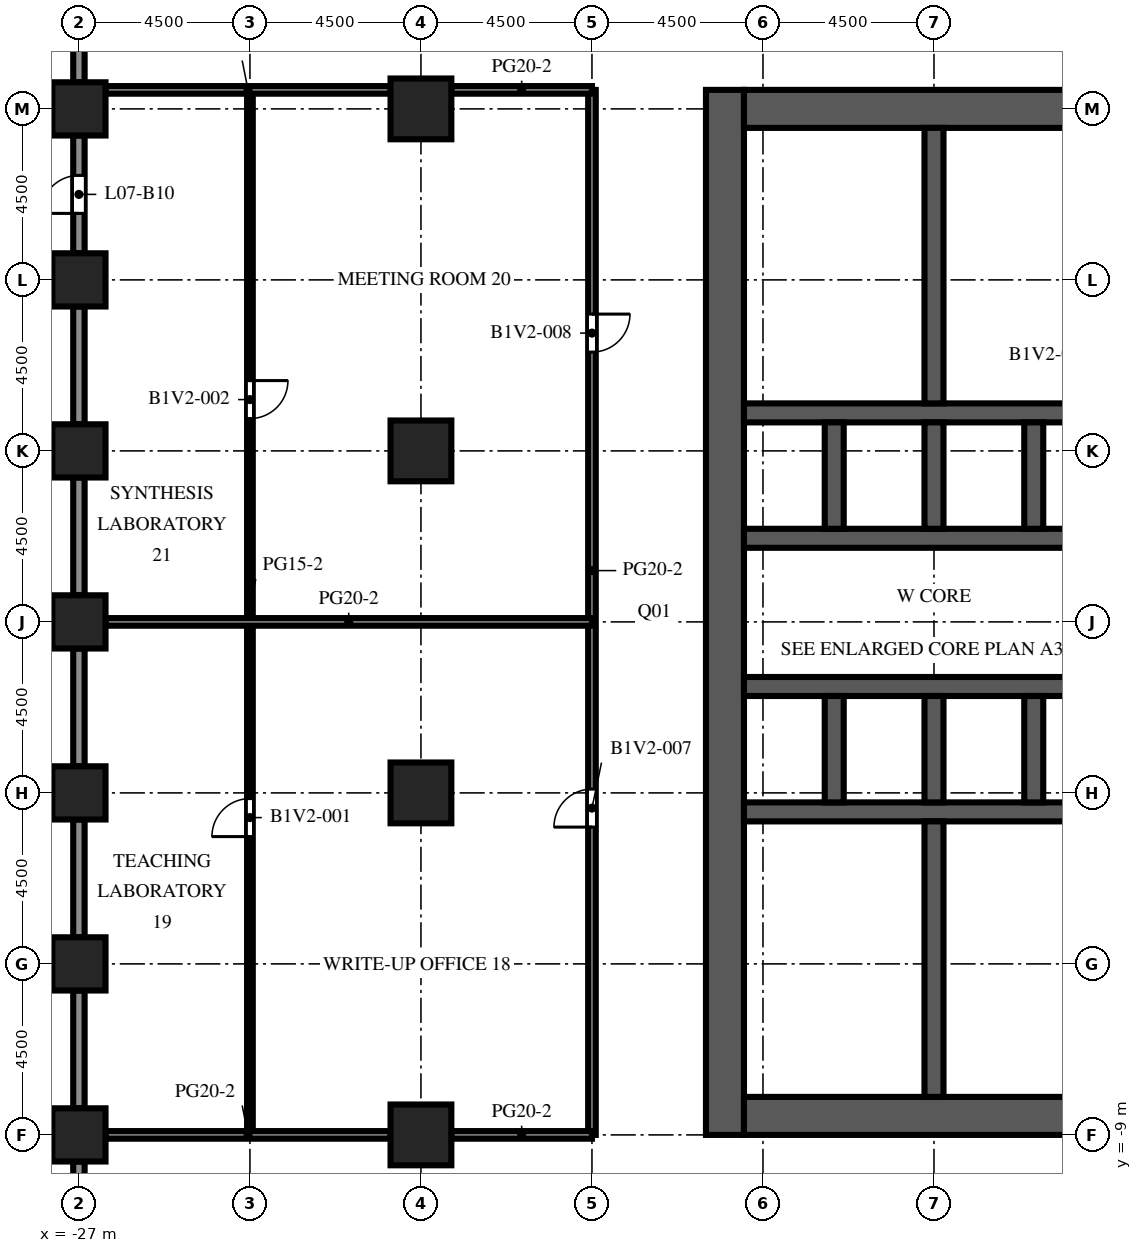
"""IFC4 building model, lengths in metres.
Left out: names, types, materials, properties, quantities, classifications, styles, units other than length and angle.
Written with IfcOpenShell. Run it as: python <this file> out.ifc"""

import sys

from ifc_helpers import new_model, si_unit, direction, frame, frame_2d, origin, origin_2d, place, context, subcontext, project, spatial, rectangle, extrude, element, fill, save


model = new_model("IFC4")
c1 = context("Model", 3, precision=1e-05, world=origin(), true_north=direction((0.0, 1.0)))
c2 = subcontext(c1, "Body", "Model", "MODEL_VIEW")
j1 = project(units=[si_unit("LENGTHUNIT", "METRE"), si_unit("PLANEANGLEUNIT", "RADIAN")], contexts=[c1])
p1 = place(None, origin())
s1 = spatial("IfcSite", under=j1, at=p1, CompositionType="ELEMENT")
p2 = place(p1, origin())
s2 = spatial("IfcBuilding", under=s1, at=p2, CompositionType="ELEMENT")
p3 = place(p2, frame((0.0, 0.0, 31.8)))
s3 = spatial("IfcBuildingStorey", under=s2, at=p3, CompositionType="ELEMENT", Elevation=31.8)
for number, where, z_axis, x_axis in (
    (1, (-27.0, -9.0, 0.0), (0.0, 0.0, 1.0), (1.0, 0.0, 0.0)),
    (2, (-27.0, -4.5, 0.0), (0.0, 0.0, 1.0), (1.0, 0.0, 0.0)),
    (3, (-27.0, 0.0, 0.0), (0.0, 0.0, 1.0), (1.0, 0.0, 0.0)),
    (4, (-27.0, 4.5, 0.0), (0.0, 0.0, 1.0), (1.0, 0.0, 0.0)),
    (5, (-27.0, 9.0, 0.0), (0.0, 0.0, 1.0), (1.0, 0.0, 0.0)),
    (6, (-27.0, 13.5, 0.0), (0.0, 0.0, 1.0), (1.0, 0.0, 0.0)),
    (7, (-27.0, 18.0, 0.0), (0.0, 0.0, 1.0), (1.0, 0.0, 0.0)),
):
    element("IfcColumn", number, at=place(p3, frame(where, z_axis=z_axis, x_axis=x_axis)), inside=s3, PredefinedType="COLUMN", context=c2, shape_type="SweptSolid", body=[
        extrude(rectangle(XDim=1.4, YDim=1.4, at=origin_2d()), origin(), (0.0, 0.0, 1.0), 4.1),
    ])
for number, where, z_axis, x_axis in (
    (8, (-18.0, -9.0, 0.0), (0.0, 0.0, 1.0), (1.0, 0.0, 0.0)),
    (9, (-18.0, 0.0, 0.0), (0.0, 0.0, 1.0), (1.0, 0.0, 0.0)),
    (10, (-18.0, 9.0, 0.0), (0.0, 0.0, 1.0), (1.0, 0.0, 0.0)),
    (11, (-18.0, 18.0, 0.0), (0.0, 0.0, 1.0), (1.0, 0.0, 0.0)),
):
    element("IfcColumn", number, at=place(p3, frame(where, z_axis=z_axis, x_axis=x_axis)), inside=s3, PredefinedType="COLUMN", context=c2, shape_type="SweptSolid", body=[
        extrude(rectangle(XDim=1.6, YDim=1.6, at=origin_2d()), origin(), (0.0, 0.0, 1.0), 4.1),
    ])
p4 = place(p3, frame((-10.0, -9.0, 0.0), z_axis=(0.0, 0.0, 1.0), x_axis=(0.0, 1.0, 0.0)))
e12 = element("IfcWall", 12, at=p4, inside=s3, PredefinedType="SHEAR", context=c2, shape_type="SweptSolid", body=[
    extrude(rectangle(XDim=27.5, YDim=1.0, at=frame_2d((13.75, 0.0))), origin(), (0.0, 0.0, 1.0), 4.1),
])
p5 = place(p4, frame((12.55, 0.0, 0.0)))
e13 = element("IfcOpeningElement", 13, at=p5, cuts=e12, PredefinedType="OPENING", context=c2, shape_type="SweptSolid", body=[
    extrude(rectangle(XDim=2.4, YDim=2.4, at=frame_2d((1.2, 1.2))), frame((0.0, 0.51, 0.0), z_axis=(0.0, -1.0, 0.0), x_axis=(1.0, 0.0, 0.0)), (0.0, 0.0, 1.0), 1.02),
])
p6 = place(p4, frame((6.825, 0.0, 0.0)))
e14 = element("IfcOpeningElement", 14, at=p6, cuts=e12, PredefinedType="OPENING", context=c2, shape_type="SweptSolid", body=[
    extrude(rectangle(XDim=1.2, YDim=2.1, at=frame_2d((0.6, 1.05))), frame((0.0, 0.51, 0.0), z_axis=(0.0, -1.0, 0.0), x_axis=(1.0, 0.0, 0.0)), (0.0, 0.0, 1.0), 1.02),
])
p7 = place(p4, frame((19.475, 0.0, 0.0)))
e15 = element("IfcOpeningElement", 15, at=p7, cuts=e12, PredefinedType="OPENING", context=c2, shape_type="SweptSolid", body=[
    extrude(rectangle(XDim=1.2, YDim=2.1, at=frame_2d((0.6, 1.05))), frame((0.0, 0.51, 0.0), z_axis=(0.0, -1.0, 0.0), x_axis=(1.0, 0.0, 0.0)), (0.0, 0.0, 1.0), 1.02),
])
for number, where, z_axis, x_axis in (
    (16, (-9.5, -8.5, 0.0), (0.0, 0.0, 1.0), (1.0, 0.0, 0.0)),
    (17, (-9.5, 18.0, 0.0), (0.0, 0.0, 1.0), (1.0, 0.0, 0.0)),
):
    element("IfcWall", number, at=place(p3, frame(where, z_axis=z_axis, x_axis=x_axis)), inside=s3, PredefinedType="SHEAR", context=c2, shape_type="SweptSolid", body=[
        extrude(rectangle(XDim=10.0, YDim=1.0, at=frame_2d((5.0, 0.0))), origin(), (0.0, 0.0, 1.0), 4.1),
    ])
p8 = place(p3, frame((-9.5, -0.5, 0.0), z_axis=(0.0, 0.0, 1.0), x_axis=(1.0, 0.0, 0.0)))
e18 = element("IfcWall", 18, at=p8, inside=s3, PredefinedType="SHEAR", context=c2, shape_type="SweptSolid", body=[
    extrude(rectangle(XDim=10.0, YDim=0.5, at=frame_2d((5.0, 0.0))), origin(), (0.0, 0.0, 1.0), 4.1),
])
p9 = place(p3, frame((-9.5, 2.8, 0.0), z_axis=(0.0, 0.0, 1.0), x_axis=(1.0, 0.0, 0.0)))
e19 = element("IfcWall", 19, at=p9, inside=s3, PredefinedType="SHEAR", context=c2, shape_type="SweptSolid", body=[
    extrude(rectangle(XDim=10.0, YDim=0.5, at=frame_2d((5.0, 0.0))), origin(), (0.0, 0.0, 1.0), 4.1),
])
p10 = place(p9, frame((0.512, 0.0, 0.0)))
e20 = element("IfcOpeningElement", 20, at=p10, cuts=e19, PredefinedType="OPENING", context=c2, shape_type="SweptSolid", body=[
    extrude(rectangle(XDim=1.1, YDim=2.1, at=frame_2d((0.55, 1.05))), frame((0.0, 0.26, 0.0), z_axis=(0.0, -1.0, 0.0), x_axis=(1.0, 0.0, 0.0)), (0.0, 0.0, 1.0), 0.52),
])
p11 = place(p9, frame((3.137, 0.0, 0.0)))
e21 = element("IfcOpeningElement", 21, at=p11, cuts=e19, PredefinedType="OPENING", context=c2, shape_type="SweptSolid", body=[
    extrude(rectangle(XDim=1.1, YDim=2.1, at=frame_2d((0.55, 1.05))), frame((0.0, 0.26, 0.0), z_axis=(0.0, -1.0, 0.0), x_axis=(1.0, 0.0, 0.0)), (0.0, 0.0, 1.0), 0.52),
])
p12 = place(p9, frame((8.387, 0.0, 0.0)))
e22 = element("IfcOpeningElement", 22, at=p12, cuts=e19, PredefinedType="OPENING", context=c2, shape_type="SweptSolid", body=[
    extrude(rectangle(XDim=1.1, YDim=2.1, at=frame_2d((0.55, 1.05))), frame((0.0, 0.26, 0.0), z_axis=(0.0, -1.0, 0.0), x_axis=(1.0, 0.0, 0.0)), (0.0, 0.0, 1.0), 0.52),
])
p13 = place(p3, frame((-9.5, 6.7, 0.0), z_axis=(0.0, 0.0, 1.0), x_axis=(1.0, 0.0, 0.0)))
e23 = element("IfcWall", 23, at=p13, inside=s3, PredefinedType="SHEAR", context=c2, shape_type="SweptSolid", body=[
    extrude(rectangle(XDim=10.0, YDim=0.5, at=frame_2d((5.0, 0.0))), origin(), (0.0, 0.0, 1.0), 4.1),
])
p14 = place(p13, frame((0.512, 0.0, 0.0)))
e24 = element("IfcOpeningElement", 24, at=p14, cuts=e23, PredefinedType="OPENING", context=c2, shape_type="SweptSolid", body=[
    extrude(rectangle(XDim=1.1, YDim=2.1, at=frame_2d((0.55, 1.05))), frame((0.0, 0.26, 0.0), z_axis=(0.0, -1.0, 0.0), x_axis=(1.0, 0.0, 0.0)), (0.0, 0.0, 1.0), 0.52),
])
p15 = place(p13, frame((3.188, 0.0, 0.0)))
e25 = element("IfcOpeningElement", 25, at=p15, cuts=e23, PredefinedType="OPENING", context=c2, shape_type="SweptSolid", body=[
    extrude(rectangle(XDim=1.0, YDim=2.1, at=frame_2d((0.5, 1.05))), frame((0.0, 0.26, 0.0), z_axis=(0.0, -1.0, 0.0), x_axis=(1.0, 0.0, 0.0)), (0.0, 0.0, 1.0), 0.52),
])
p16 = place(p13, frame((5.812, 0.0, 0.0)))
e26 = element("IfcOpeningElement", 26, at=p16, cuts=e23, PredefinedType="OPENING", context=c2, shape_type="SweptSolid", body=[
    extrude(rectangle(XDim=1.0, YDim=2.1, at=frame_2d((0.5, 1.05))), frame((0.0, 0.26, 0.0), z_axis=(0.0, -1.0, 0.0), x_axis=(1.0, 0.0, 0.0)), (0.0, 0.0, 1.0), 0.52),
])
p17 = place(p13, frame((8.438, 0.0, 0.0)))
e27 = element("IfcOpeningElement", 27, at=p17, cuts=e23, PredefinedType="OPENING", context=c2, shape_type="SweptSolid", body=[
    extrude(rectangle(XDim=1.0, YDim=2.1, at=frame_2d((0.5, 1.05))), frame((0.0, 0.26, 0.0), z_axis=(0.0, -1.0, 0.0), x_axis=(1.0, 0.0, 0.0)), (0.0, 0.0, 1.0), 0.52),
])
p18 = place(p3, frame((-9.5, 10.0, 0.0), z_axis=(0.0, 0.0, 1.0), x_axis=(1.0, 0.0, 0.0)))
e28 = element("IfcWall", 28, at=p18, inside=s3, PredefinedType="SHEAR", context=c2, shape_type="SweptSolid", body=[
    extrude(rectangle(XDim=10.0, YDim=0.5, at=frame_2d((5.0, 0.0))), origin(), (0.0, 0.0, 1.0), 4.1),
])
for number, where, z_axis, x_axis in (
    (29, (-7.125, -0.25, 0.0), (0.0, 0.0, 1.0), (0.0, 1.0, 0.0)),
    (30, (-7.125, 6.95, 0.0), (0.0, 0.0, 1.0), (0.0, 1.0, 0.0)),
    (31, (-4.5, -0.25, 0.0), (0.0, 0.0, 1.0), (0.0, 1.0, 0.0)),
    (32, (-4.5, 6.95, 0.0), (0.0, 0.0, 1.0), (0.0, 1.0, 0.0)),
    (33, (-1.875, -0.25, 0.0), (0.0, 0.0, 1.0), (0.0, 1.0, 0.0)),
    (34, (-1.875, 6.95, 0.0), (0.0, 0.0, 1.0), (0.0, 1.0, 0.0)),
):
    element("IfcWall", number, at=place(p3, frame(where, z_axis=z_axis, x_axis=x_axis)), inside=s3, PredefinedType="SHEAR", context=c2, shape_type="SweptSolid", body=[
        extrude(rectangle(XDim=2.8, YDim=0.5, at=frame_2d((1.4, 0.0))), origin(), (0.0, 0.0, 1.0), 4.1),
    ])
for number, where, z_axis, x_axis in (
    (35, (-4.5, -8.0, 0.0), (0.0, 0.0, 1.0), (0.0, 1.0, 0.0)),
    (36, (-4.5, 10.25, 0.0), (0.0, 0.0, 1.0), (0.0, 1.0, 0.0)),
):
    element("IfcWall", number, at=place(p3, frame(where, z_axis=z_axis, x_axis=x_axis)), inside=s3, PredefinedType="SHEAR", context=c2, shape_type="SweptSolid", body=[
        extrude(rectangle(XDim=7.25, YDim=0.5, at=frame_2d((3.625, 0.0))), origin(), (0.0, 0.0, 1.0), 4.1),
    ])
p19 = place(p3, frame((-27.0, 18.7, 0.0), z_axis=(0.0, 0.0, 1.0), x_axis=(0.0, 1.0, 0.0)))
e37 = element("IfcWall", 37, at=p19, inside=s3, PredefinedType="SOLIDWALL", context=c2, shape_type="SweptSolid", body=[
    extrude(rectangle(XDim=3.1, YDim=0.3, at=frame_2d((1.55, 0.0))), origin(), (0.0, 0.0, 1.0), 2.6),
])
p20 = place(p3, frame((-27.0, 14.2, 0.0), z_axis=(0.0, 0.0, 1.0), x_axis=(0.0, 1.0, 0.0)))
e38 = element("IfcWall", 38, at=p20, inside=s3, PredefinedType="SOLIDWALL", context=c2, shape_type="SweptSolid", body=[
    extrude(rectangle(XDim=3.1, YDim=0.3, at=frame_2d((1.55, 0.0))), origin(), (0.0, 0.0, 1.0), 2.6),
])
p21 = place(p20, frame((1.05, 0.0, 0.0)))
e39 = element("IfcOpeningElement", 39, at=p21, cuts=e38, PredefinedType="OPENING", context=c2, shape_type="SweptSolid", body=[
    extrude(rectangle(XDim=1.0, YDim=2.2, at=frame_2d((0.5, 1.1))), frame((0.0, 0.16, 0.0), z_axis=(0.0, -1.0, 0.0), x_axis=(1.0, 0.0, 0.0)), (0.0, 0.0, 1.0), 0.32),
])
for number, where, z_axis, x_axis in (
    (40, (-27.0, 9.7, 0.0), (0.0, 0.0, 1.0), (0.0, 1.0, 0.0)),
    (41, (-27.0, 5.2, 0.0), (0.0, 0.0, 1.0), (0.0, 1.0, 0.0)),
    (42, (-27.0, 0.7, 0.0), (0.0, 0.0, 1.0), (0.0, 1.0, 0.0)),
    (43, (-27.0, -3.8, 0.0), (0.0, 0.0, 1.0), (0.0, 1.0, 0.0)),
    (44, (-27.0, -8.3, 0.0), (0.0, 0.0, 1.0), (0.0, 1.0, 0.0)),
    (45, (-27.0, -12.8, 0.0), (0.0, 0.0, 1.0), (0.0, 1.0, 0.0)),
):
    element("IfcWall", number, at=place(p3, frame(where, z_axis=z_axis, x_axis=x_axis)), inside=s3, PredefinedType="SOLIDWALL", context=c2, shape_type="SweptSolid", body=[
        extrude(rectangle(XDim=3.1, YDim=0.3, at=frame_2d((1.55, 0.0))), origin(), (0.0, 0.0, 1.0), 2.6),
    ])
p22 = place(p3, frame((-1.1, -5.825, 0.0), z_axis=(0.0, 0.0, 1.0), x_axis=(0.0, 1.0, 0.0)))
e46 = element("IfcWall", 46, at=p22, inside=s3, PredefinedType="PARTITIONING", context=c2, shape_type="SweptSolid", body=[
    extrude(rectangle(XDim=2.9, YDim=0.1, at=frame_2d((1.45, 0.0))), origin(), (0.0, 0.0, 1.0), 3.5),
])
p23 = place(p22, frame((0.95, 0.0, 0.0)))
e47 = element("IfcOpeningElement", 47, at=p23, cuts=e46, PredefinedType="OPENING", context=c2, shape_type="SweptSolid", body=[
    extrude(rectangle(XDim=1.0, YDim=2.1, at=frame_2d((0.5, 1.05))), frame((0.0, 0.06, 0.0), z_axis=(0.0, -1.0, 0.0), x_axis=(1.0, 0.0, 0.0)), (0.0, 0.0, 1.0), 0.12),
])
for number, where, z_axis, x_axis in (
    (48, (-4.25, -5.825, 0.0), (0.0, 0.0, 1.0), (1.0, 0.0, 0.0)),
    (49, (-4.25, -2.925, 0.0), (0.0, 0.0, 1.0), (1.0, 0.0, 0.0)),
):
    element("IfcWall", number, at=place(p3, frame(where, z_axis=z_axis, x_axis=x_axis)), inside=s3, PredefinedType="PARTITIONING", context=c2, shape_type="SweptSolid", body=[
        extrude(rectangle(XDim=3.15, YDim=0.1, at=frame_2d((1.575, 0.0))), origin(), (0.0, 0.0, 1.0), 3.5),
    ])
for number, where, z_axis, x_axis in (
    (50, (-4.25, 11.7, 0.0), (0.0, 0.0, 1.0), (1.0, 0.0, 0.0)),
    (51, (-4.25, 13.512, 0.0), (0.0, 0.0, 1.0), (1.0, 0.0, 0.0)),
    (52, (-4.25, 15.688, 0.0), (0.0, 0.0, 1.0), (1.0, 0.0, 0.0)),
):
    element("IfcWall", number, at=place(p3, frame(where, z_axis=z_axis, x_axis=x_axis)), inside=s3, PredefinedType="PARTITIONING", context=c2, shape_type="SweptSolid", body=[
        extrude(rectangle(XDim=4.75, YDim=0.1, at=frame_2d((2.375, 0.0))), origin(), (0.0, 0.0, 1.0), 3.5),
    ])
p24 = place(p3, frame((-22.5, -9.0, 0.0), z_axis=(0.0, 0.0, 1.0), x_axis=(0.0, 1.0, 0.0)))
e53 = element("IfcWall", 53, at=p24, inside=s3, PredefinedType="PARTITIONING", context=c2, shape_type="SweptSolid", body=[
    extrude(rectangle(XDim=27.5, YDim=0.15, at=frame_2d((13.75, 0.0))), origin(), (0.0, 0.0, 1.0), 3.5),
])
p25 = place(p24, frame((7.85, 0.0, 0.0)))
e54 = element("IfcOpeningElement", 54, at=p25, cuts=e53, PredefinedType="OPENING", context=c2, shape_type="SweptSolid", body=[
    extrude(rectangle(XDim=1.0, YDim=2.1, at=frame_2d((0.5, 1.05))), frame((0.0, 0.085, 0.0), z_axis=(0.0, -1.0, 0.0), x_axis=(1.0, 0.0, 0.0)), (0.0, 0.0, 1.0), 0.17),
])
p26 = place(p24, frame((18.85, 0.0, 0.0)))
e55 = element("IfcOpeningElement", 55, at=p26, cuts=e53, PredefinedType="OPENING", context=c2, shape_type="SweptSolid", body=[
    extrude(rectangle(XDim=1.0, YDim=2.1, at=frame_2d((0.5, 1.05))), frame((0.0, 0.085, 0.0), z_axis=(0.0, -1.0, 0.0), x_axis=(1.0, 0.0, 0.0)), (0.0, 0.0, 1.0), 0.17),
])
p27 = place(p3, frame((-13.5, -9.0, 0.0), z_axis=(0.0, 0.0, 1.0), x_axis=(0.0, 1.0, 0.0)))
e56 = element("IfcWall", 56, at=p27, inside=s3, PredefinedType="PARTITIONING", context=c2, shape_type="SweptSolid", body=[
    extrude(rectangle(XDim=27.5, YDim=0.2, at=frame_2d((13.75, 0.0))), origin(), (0.0, 0.0, 1.0), 3.5),
])
p28 = place(p27, frame((8.1, 0.0, 0.0)))
e57 = element("IfcOpeningElement", 57, at=p28, cuts=e56, PredefinedType="OPENING", context=c2, shape_type="SweptSolid", body=[
    extrude(rectangle(XDim=1.0, YDim=2.1, at=frame_2d((0.5, 1.05))), frame((0.0, 0.11, 0.0), z_axis=(0.0, -1.0, 0.0), x_axis=(1.0, 0.0, 0.0)), (0.0, 0.0, 1.0), 0.22),
])
p29 = place(p27, frame((20.6, 0.0, 0.0)))
e58 = element("IfcOpeningElement", 58, at=p29, cuts=e56, PredefinedType="OPENING", context=c2, shape_type="SweptSolid", body=[
    extrude(rectangle(XDim=1.0, YDim=2.1, at=frame_2d((0.5, 1.05))), frame((0.0, 0.11, 0.0), z_axis=(0.0, -1.0, 0.0), x_axis=(1.0, 0.0, 0.0)), (0.0, 0.0, 1.0), 0.22),
])
p30 = place(p3, frame((-26.3, -9.0, 0.0), z_axis=(0.0, 0.0, 1.0), x_axis=(1.0, 0.0, 0.0)))
e59 = element("IfcWall", 59, at=p30, inside=s3, PredefinedType="PARTITIONING", context=c2, shape_type="SweptSolid", body=[
    extrude(rectangle(XDim=7.5, YDim=0.2, at=frame_2d((3.75, 0.0))), origin(), (0.0, 0.0, 1.0), 3.5),
])
p31 = place(p3, frame((-17.2, -9.0, 0.0), z_axis=(0.0, 0.0, 1.0), x_axis=(1.0, 0.0, 0.0)))
e60 = element("IfcWall", 60, at=p31, inside=s3, PredefinedType="PARTITIONING", context=c2, shape_type="SweptSolid", body=[
    extrude(rectangle(XDim=3.7, YDim=0.2, at=frame_2d((1.85, 0.0))), origin(), (0.0, 0.0, 1.0), 3.5),
])
p32 = place(p3, frame((-26.3, 4.5, 0.0), z_axis=(0.0, 0.0, 1.0), x_axis=(1.0, 0.0, 0.0)))
e61 = element("IfcWall", 61, at=p32, inside=s3, PredefinedType="PARTITIONING", context=c2, shape_type="SweptSolid", body=[
    extrude(rectangle(XDim=12.8, YDim=0.2, at=frame_2d((6.4, 0.0))), origin(), (0.0, 0.0, 1.0), 3.5),
])
p33 = place(p3, frame((-26.3, 18.5, 0.0), z_axis=(0.0, 0.0, 1.0), x_axis=(1.0, 0.0, 0.0)))
e62 = element("IfcWall", 62, at=p33, inside=s3, PredefinedType="PARTITIONING", context=c2, shape_type="SweptSolid", body=[
    extrude(rectangle(XDim=7.5, YDim=0.2, at=frame_2d((3.75, 0.0))), origin(), (0.0, 0.0, 1.0), 3.5),
])
p34 = place(p3, frame((-17.2, 18.5, 0.0), z_axis=(0.0, 0.0, 1.0), x_axis=(1.0, 0.0, 0.0)))
e63 = element("IfcWall", 63, at=p34, inside=s3, PredefinedType="PARTITIONING", context=c2, shape_type="SweptSolid", body=[
    extrude(rectangle(XDim=3.7, YDim=0.2, at=frame_2d((1.85, 0.0))), origin(), (0.0, 0.0, 1.0), 3.5),
])
p35 = place(p21, origin())
e64 = element("IfcDoor", 64, at=p35, inside=s3, OperationType="SINGLE_SWING_LEFT", PredefinedType="DOOR", context=c2, shape_type="SweptSolid", body=[
    extrude(rectangle(XDim=1.0, YDim=2.2, at=frame_2d((0.5, 1.1))), frame((0.0, 0.025, 0.0), z_axis=(0.0, -1.0, 0.0), x_axis=(1.0, 0.0, 0.0)), (0.0, 0.0, 1.0), 0.05),
])
fill(e39, e64)
p36 = place(p10, origin())
e65 = element("IfcDoor", 65, at=p36, inside=s3, OperationType="DOUBLE_DOOR_SLIDING", PredefinedType="DOOR", context=c2, shape_type="SweptSolid", body=[
    extrude(rectangle(XDim=1.1, YDim=2.1, at=frame_2d((0.55, 1.05))), frame((0.0, 0.025, 0.0), z_axis=(0.0, -1.0, 0.0), x_axis=(1.0, 0.0, 0.0)), (0.0, 0.0, 1.0), 0.05),
])
fill(e20, e65)
p37 = place(p11, origin())
e66 = element("IfcDoor", 66, at=p37, inside=s3, OperationType="DOUBLE_DOOR_SLIDING", PredefinedType="DOOR", context=c2, shape_type="SweptSolid", body=[
    extrude(rectangle(XDim=1.1, YDim=2.1, at=frame_2d((0.55, 1.05))), frame((0.0, 0.025, 0.0), z_axis=(0.0, -1.0, 0.0), x_axis=(1.0, 0.0, 0.0)), (0.0, 0.0, 1.0), 0.05),
])
fill(e21, e66)
p38 = place(p14, origin())
e67 = element("IfcDoor", 67, at=p38, inside=s3, OperationType="DOUBLE_DOOR_SLIDING", PredefinedType="DOOR", context=c2, shape_type="SweptSolid", body=[
    extrude(rectangle(XDim=1.1, YDim=2.1, at=frame_2d((0.55, 1.05))), frame((0.0, 0.025, 0.0), z_axis=(0.0, -1.0, 0.0), x_axis=(1.0, 0.0, 0.0)), (0.0, 0.0, 1.0), 0.05),
])
fill(e24, e67)
p39 = place(p5, origin())
e68 = element("IfcDoor", 68, at=p39, inside=s3, OperationType="DOUBLE_DOOR_DOUBLE_SWING", PredefinedType="DOOR", context=c2, shape_type="SweptSolid", body=[
    extrude(rectangle(XDim=2.4, YDim=2.4, at=frame_2d((1.2, 1.2))), frame((0.0, 0.025, 0.0), z_axis=(0.0, -1.0, 0.0), x_axis=(1.0, 0.0, 0.0)), (0.0, 0.0, 1.0), 0.05),
])
fill(e13, e68)
p40 = place(p6, origin())
e69 = element("IfcDoor", 69, at=p40, inside=s3, OperationType="SINGLE_SWING_LEFT", PredefinedType="DOOR", context=c2, shape_type="SweptSolid", body=[
    extrude(rectangle(XDim=1.2, YDim=2.1, at=frame_2d((0.6, 1.05))), frame((0.0, 0.025, 0.0), z_axis=(0.0, -1.0, 0.0), x_axis=(1.0, 0.0, 0.0)), (0.0, 0.0, 1.0), 0.05),
])
fill(e14, e69)
p41 = place(p7, origin())
e70 = element("IfcDoor", 70, at=p41, inside=s3, OperationType="SINGLE_SWING_LEFT", PredefinedType="DOOR", context=c2, shape_type="SweptSolid", body=[
    extrude(rectangle(XDim=1.2, YDim=2.1, at=frame_2d((0.6, 1.05))), frame((0.0, 0.025, 0.0), z_axis=(0.0, -1.0, 0.0), x_axis=(1.0, 0.0, 0.0)), (0.0, 0.0, 1.0), 0.05),
])
fill(e15, e70)
p42 = place(p15, origin())
e71 = element("IfcDoor", 71, at=p42, inside=s3, OperationType="SINGLE_SWING_RIGHT", PredefinedType="DOOR", context=c2, shape_type="SweptSolid", body=[
    extrude(rectangle(XDim=1.0, YDim=2.1, at=frame_2d((0.5, 1.05))), frame((0.0, 0.025, 0.0), z_axis=(0.0, -1.0, 0.0), x_axis=(1.0, 0.0, 0.0)), (0.0, 0.0, 1.0), 0.05),
])
fill(e25, e71)
p43 = place(p16, origin())
e72 = element("IfcDoor", 72, at=p43, inside=s3, OperationType="SINGLE_SWING_LEFT", PredefinedType="DOOR", context=c2, shape_type="SweptSolid", body=[
    extrude(rectangle(XDim=1.0, YDim=2.1, at=frame_2d((0.5, 1.05))), frame((0.0, 0.025, 0.0), z_axis=(0.0, -1.0, 0.0), x_axis=(1.0, 0.0, 0.0)), (0.0, 0.0, 1.0), 0.05),
])
fill(e26, e72)
p44 = place(p25, origin())
e73 = element("IfcDoor", 73, at=p44, inside=s3, OperationType="SINGLE_SWING_LEFT", PredefinedType="DOOR", context=c2, shape_type="SweptSolid", body=[
    extrude(rectangle(XDim=1.0, YDim=2.1, at=frame_2d((0.5, 1.05))), frame((0.0, 0.025, 0.0), z_axis=(0.0, -1.0, 0.0), x_axis=(1.0, 0.0, 0.0)), (0.0, 0.0, 1.0), 0.05),
])
fill(e54, e73)
p45 = place(p26, origin())
e74 = element("IfcDoor", 74, at=p45, inside=s3, OperationType="SINGLE_SWING_RIGHT", PredefinedType="DOOR", context=c2, shape_type="SweptSolid", body=[
    extrude(rectangle(XDim=1.0, YDim=2.1, at=frame_2d((0.5, 1.05))), frame((0.0, 0.025, 0.0), z_axis=(0.0, -1.0, 0.0), x_axis=(1.0, 0.0, 0.0)), (0.0, 0.0, 1.0), 0.05),
])
fill(e55, e74)
p46 = place(p28, origin())
e75 = element("IfcDoor", 75, at=p46, inside=s3, OperationType="SINGLE_SWING_LEFT", PredefinedType="DOOR", context=c2, shape_type="SweptSolid", body=[
    extrude(rectangle(XDim=1.0, YDim=2.1, at=frame_2d((0.5, 1.05))), frame((0.0, 0.025, 0.0), z_axis=(0.0, -1.0, 0.0), x_axis=(1.0, 0.0, 0.0)), (0.0, 0.0, 1.0), 0.05),
])
fill(e57, e75)
p47 = place(p29, origin())
e76 = element("IfcDoor", 76, at=p47, inside=s3, OperationType="SINGLE_SWING_RIGHT", PredefinedType="DOOR", context=c2, shape_type="SweptSolid", body=[
    extrude(rectangle(XDim=1.0, YDim=2.1, at=frame_2d((0.5, 1.05))), frame((0.0, 0.025, 0.0), z_axis=(0.0, -1.0, 0.0), x_axis=(1.0, 0.0, 0.0)), (0.0, 0.0, 1.0), 0.05),
])
fill(e58, e76)
save(model, sys.argv[1])
